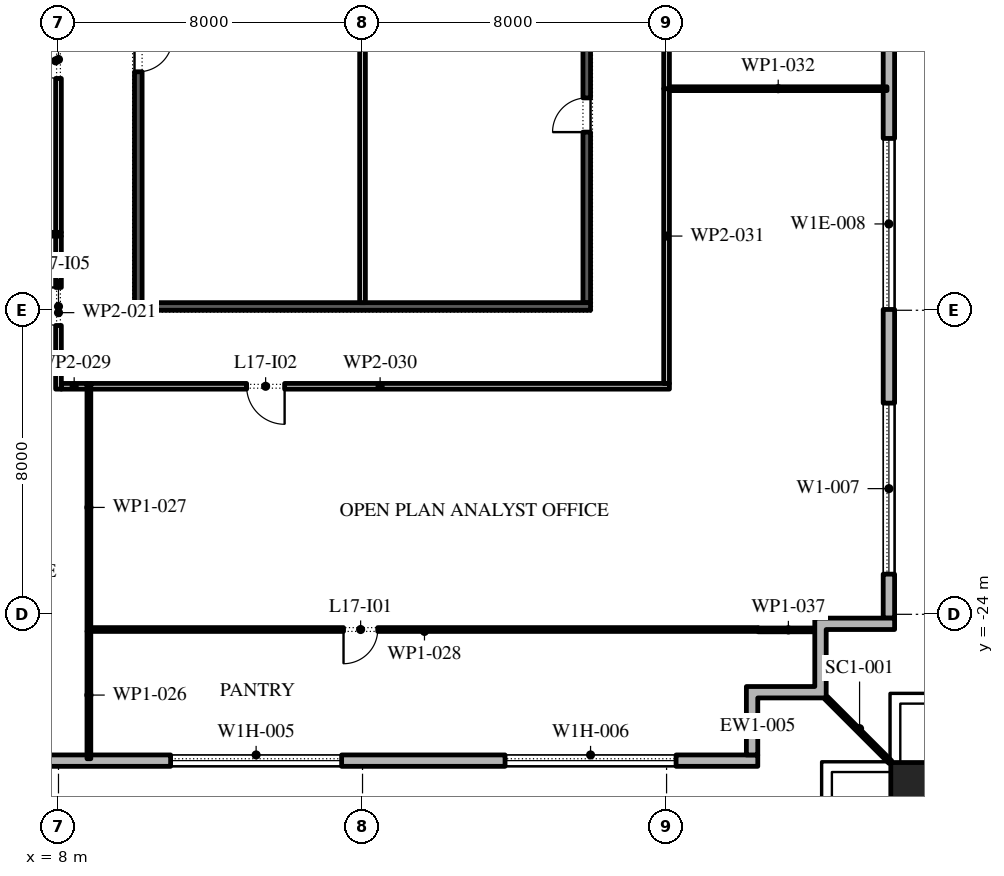
"""IFC4 building model, lengths in metres.
Left out: names, types, materials, properties, quantities, classifications, styles, units other than length and angle.
Written with IfcOpenShell. Run it as: python <this file> out.ifc"""

import sys

from ifc_helpers import new_model, si_unit, direction, frame, frame_2d, origin, origin_2d, place, context, subcontext, project, spatial, polyline, rectangle, outline, extrude, element, fill, save


model = new_model("IFC4")
c1 = context("Model", 3, precision=1e-05, world=origin(), true_north=direction((0.0, 1.0)))
c2 = subcontext(c1, "Body", "Model", "MODEL_VIEW")
j1 = project(units=[si_unit("LENGTHUNIT", "METRE"), si_unit("PLANEANGLEUNIT", "RADIAN")], contexts=[c1])
p1 = place(None, origin())
s1 = spatial("IfcSite", under=j1, at=p1, CompositionType="ELEMENT")
p2 = place(p1, origin())
s2 = spatial("IfcBuilding", under=s1, at=p2, CompositionType="ELEMENT")
p3 = place(p2, frame((0.0, 0.0, 81.6)))
s3 = spatial("IfcBuildingStorey", under=s2, at=p3, CompositionType="ELEMENT", Elevation=81.6)
p4 = place(p3, frame((30.6, -28.6, 0.0), z_axis=(0.0, 0.0, 1.0), x_axis=(1.0, 0.0, 0.0)))
e1 = element("IfcColumn", 1, at=p4, inside=s3, PredefinedType="COLUMN", context=c2, shape_type="SweptSolid", body=[
    extrude(rectangle(XDim=1.4, YDim=1.4, at=origin_2d()), origin(), (0.0, 0.0, 1.0), 4.2),
])
p5 = place(p3, frame((-26.1, -27.85, 0.0), z_axis=(0.0, 0.0, 1.0), x_axis=(1.0, 0.0, 0.0)))
e2 = element("IfcWall", 2, at=p5, inside=s3, PredefinedType="STANDARD", context=c2, shape_type="SweptSolid", body=[
    extrude(rectangle(XDim=52.5, YDim=0.3, at=frame_2d((26.25, 0.0))), origin(), (0.0, 0.0, 1.0), 4.0),
])
p6 = place(p5, frame((2.0, 0.0, 0.45)))
e3 = element("IfcOpeningElement", 3, at=p6, cuts=e2, PredefinedType="OPENING", context=c2, shape_type="SweptSolid", body=[
    extrude(rectangle(XDim=4.5, YDim=2.75, at=frame_2d((2.25, 1.375))), frame((0.0, 0.16, 0.0), z_axis=(0.0, -1.0, 0.0), x_axis=(1.0, 0.0, 0.0)), (0.0, 0.0, 1.0), 0.32),
])
p7 = place(p5, frame((10.65, 0.0, 0.45)))
e4 = element("IfcOpeningElement", 4, at=p7, cuts=e2, PredefinedType="OPENING", context=c2, shape_type="SweptSolid", body=[
    extrude(rectangle(XDim=4.5, YDim=2.75, at=frame_2d((2.25, 1.375))), frame((0.0, 0.16, 0.0), z_axis=(0.0, -1.0, 0.0), x_axis=(1.0, 0.0, 0.0)), (0.0, 0.0, 1.0), 0.32),
])
p8 = place(p5, frame((20.5, 0.0, 0.0)))
e5 = element("IfcOpeningElement", 5, at=p8, cuts=e2, PredefinedType="OPENING", context=c2, shape_type="SweptSolid", body=[
    extrude(rectangle(XDim=2.4, YDim=3.5, at=frame_2d((1.2, 1.75))), frame((0.0, 0.16, 0.0), z_axis=(0.0, -1.0, 0.0), x_axis=(1.0, 0.0, 0.0)), (0.0, 0.0, 1.0), 0.32),
])
p9 = place(p5, frame((28.25, 0.0, 0.45)))
e6 = element("IfcOpeningElement", 6, at=p9, cuts=e2, PredefinedType="OPENING", context=c2, shape_type="SweptSolid", body=[
    extrude(rectangle(XDim=4.5, YDim=2.75, at=frame_2d((2.25, 1.375))), frame((0.0, 0.16, 0.0), z_axis=(0.0, -1.0, 0.0), x_axis=(1.0, 0.0, 0.0)), (0.0, 0.0, 1.0), 0.32),
])
p10 = place(p5, frame((37.05, 0.0, 0.45)))
e7 = element("IfcOpeningElement", 7, at=p10, cuts=e2, PredefinedType="OPENING", context=c2, shape_type="SweptSolid", body=[
    extrude(rectangle(XDim=4.5, YDim=2.75, at=frame_2d((2.25, 1.375))), frame((0.0, 0.16, 0.0), z_axis=(0.0, -1.0, 0.0), x_axis=(1.0, 0.0, 0.0)), (0.0, 0.0, 1.0), 0.32),
])
p11 = place(p5, frame((45.85, 0.0, 0.45)))
e8 = element("IfcOpeningElement", 8, at=p11, cuts=e2, PredefinedType="OPENING", context=c2, shape_type="SweptSolid", body=[
    extrude(rectangle(XDim=4.5, YDim=2.75, at=frame_2d((2.25, 1.375))), frame((0.0, 0.16, 0.0), z_axis=(0.0, -1.0, 0.0), x_axis=(1.0, 0.0, 0.0)), (0.0, 0.0, 1.0), 0.32),
])
p12 = place(p3, frame((29.85, -24.1, 0.0), z_axis=(0.0, 0.0, 1.0), x_axis=(0.0, 1.0, 0.0)))
e9 = element("IfcWall", 9, at=p12, inside=s3, PredefinedType="STANDARD", context=c2, shape_type="SweptSolid", body=[
    extrude(rectangle(XDim=49.5, YDim=0.3, at=frame_2d((24.75, 0.0))), origin(), (0.0, 0.0, 1.0), 4.0),
])
p13 = place(p12, frame((1.157, 0.0, 0.45)))
e10 = element("IfcOpeningElement", 10, at=p13, cuts=e9, PredefinedType="OPENING", context=c2, shape_type="SweptSolid", body=[
    extrude(rectangle(XDim=4.5, YDim=3.05, at=frame_2d((2.25, 1.525))), frame((0.0, 0.16, 0.0), z_axis=(0.0, -1.0, 0.0), x_axis=(1.0, 0.0, 0.0)), (0.0, 0.0, 1.0), 0.32),
])
p14 = place(p12, frame((8.121, 0.0, 0.45)))
e11 = element("IfcOpeningElement", 11, at=p14, cuts=e9, PredefinedType="OPENING", context=c2, shape_type="SweptSolid", body=[
    extrude(rectangle(XDim=4.5, YDim=2.825, at=frame_2d((2.25, 1.413))), frame((0.0, 0.16, 0.0), z_axis=(0.0, -1.0, 0.0), x_axis=(1.0, 0.0, 0.0)), (0.0, 0.0, 1.0), 0.32),
])
p15 = place(p12, frame((16.286, 0.0, 0.0)))
e12 = element("IfcOpeningElement", 12, at=p15, cuts=e9, PredefinedType="OPENING", context=c2, shape_type="SweptSolid", body=[
    extrude(rectangle(XDim=2.4, YDim=3.325, at=frame_2d((1.2, 1.663))), frame((0.0, 0.16, 0.0), z_axis=(0.0, -1.0, 0.0), x_axis=(1.0, 0.0, 0.0)), (0.0, 0.0, 1.0), 0.32),
])
p16 = place(p12, frame((22.35, 0.0, 0.45)))
e13 = element("IfcOpeningElement", 13, at=p16, cuts=e9, PredefinedType="OPENING", context=c2, shape_type="SweptSolid", body=[
    extrude(rectangle(XDim=4.5, YDim=2.875, at=frame_2d((2.25, 1.438))), frame((0.0, 0.16, 0.0), z_axis=(0.0, -1.0, 0.0), x_axis=(1.0, 0.0, 0.0)), (0.0, 0.0, 1.0), 0.32),
])
p17 = place(p12, frame((29.464, 0.0, 0.45)))
e14 = element("IfcOpeningElement", 14, at=p17, cuts=e9, PredefinedType="OPENING", context=c2, shape_type="SweptSolid", body=[
    extrude(rectangle(XDim=4.5, YDim=2.875, at=frame_2d((2.25, 1.438))), frame((0.0, 0.16, 0.0), z_axis=(0.0, -1.0, 0.0), x_axis=(1.0, 0.0, 0.0)), (0.0, 0.0, 1.0), 0.32),
])
p18 = place(p12, frame((36.579, 0.0, 0.45)))
e15 = element("IfcOpeningElement", 15, at=p18, cuts=e9, PredefinedType="OPENING", context=c2, shape_type="SweptSolid", body=[
    extrude(rectangle(XDim=4.5, YDim=3.05, at=frame_2d((2.25, 1.525))), frame((0.0, 0.16, 0.0), z_axis=(0.0, -1.0, 0.0), x_axis=(1.0, 0.0, 0.0)), (0.0, 0.0, 1.0), 0.32),
])
p19 = place(p12, frame((44.743, 0.0, 0.0)))
e16 = element("IfcOpeningElement", 16, at=p19, cuts=e9, PredefinedType="OPENING", context=c2, shape_type="SweptSolid", body=[
    extrude(rectangle(XDim=2.4, YDim=3.325, at=frame_2d((1.2, 1.663))), frame((0.0, 0.16, 0.0), z_axis=(0.0, -1.0, 0.0), x_axis=(1.0, 0.0, 0.0)), (0.0, 0.0, 1.0), 0.32),
])
p20 = place(p3, origin())
e17 = element("IfcWall", 17, at=p20, inside=s3, PredefinedType="STANDARD", context=c2, shape_type="SweptSolid", body=[
    extrude(outline(polyline([(27.9, -25.9), (27.9, -24.1), (30.0, -24.1), (30.0, -24.4), (28.2, -24.4), (28.2, -26.2), (26.4, -26.2), (26.4, -27.7), (26.1, -27.7), (26.1, -25.9), (27.9, -25.9)])), origin(), (0.0, 0.0, 1.0), 4.0),
])
p21 = place(p3, frame((28.2, -26.2, -0.05), z_axis=(0.0, 0.0, 1.0), x_axis=(0.707106781187, -0.707106781187, 0.0)))
e18 = element("IfcWall", 18, at=p21, inside=s3, PredefinedType="STANDARD", context=c2, shape_type="SweptSolid", body=[
    extrude(rectangle(XDim=2.385, YDim=0.1, at=frame_2d((1.192, 0.0))), origin(), (0.0, 0.0, 1.0), 4.05),
])
p22 = place(p3, frame((21.9, -15.8, 0.0), z_axis=(0.0, 0.0, 1.0), x_axis=(0.0, 1.0, 0.0)))
e19 = element("IfcWall", 19, at=p22, inside=s3, PredefinedType="SHEAR", context=c2, shape_type="SweptSolid", body=[
    extrude(rectangle(XDim=13.05, YDim=0.2, at=frame_2d((6.525, 0.0))), origin(), (0.0, 0.0, 1.0), 4.0),
])
p23 = place(p22, frame((4.488, 0.0, 0.0)))
e20 = element("IfcOpeningElement", 20, at=p23, cuts=e19, PredefinedType="OPENING", context=c2, shape_type="SweptSolid", body=[
    extrude(rectangle(XDim=0.9, YDim=2.1, at=frame_2d((0.45, 1.05))), frame((0.0, 0.11, 0.0), z_axis=(0.0, -1.0, 0.0), x_axis=(1.0, 0.0, 0.0)), (0.0, 0.0, 1.0), 0.22),
])
p24 = place(p22, frame((11.038, 0.0, 0.0)))
e21 = element("IfcOpeningElement", 21, at=p24, cuts=e19, PredefinedType="OPENING", context=c2, shape_type="SweptSolid", body=[
    extrude(rectangle(XDim=1.0, YDim=2.1, at=frame_2d((0.5, 1.05))), frame((0.0, 0.11, 0.0), z_axis=(0.0, -1.0, 0.0), x_axis=(1.0, 0.0, 0.0)), (0.0, 0.0, 1.0), 0.22),
])
p25 = place(p3, frame((10.1, -15.8, 0.0), z_axis=(0.0, 0.0, 1.0), x_axis=(0.0, 1.0, 0.0)))
e22 = element("IfcWall", 22, at=p25, inside=s3, PredefinedType="SHEAR", context=c2, shape_type="SweptSolid", body=[
    extrude(rectangle(XDim=13.05, YDim=0.2, at=frame_2d((6.525, 0.0))), origin(), (0.0, 0.0, 1.0), 4.0),
])
p26 = place(p25, frame((6.075, 0.0, 0.0)))
e23 = element("IfcOpeningElement", 23, at=p26, cuts=e22, PredefinedType="OPENING", context=c2, shape_type="SweptSolid", body=[
    extrude(rectangle(XDim=0.9, YDim=2.1, at=frame_2d((0.45, 1.05))), frame((0.0, 0.11, 0.0), z_axis=(0.0, -1.0, 0.0), x_axis=(1.0, 0.0, 0.0)), (0.0, 0.0, 1.0), 0.22),
])
p27 = place(p3, frame((10.0, -15.9, 0.0), z_axis=(0.0, 0.0, 1.0), x_axis=(1.0, 0.0, 0.0)))
e24 = element("IfcWall", 24, at=p27, inside=s3, PredefinedType="SHEAR", context=c2, shape_type="SweptSolid", body=[
    extrude(rectangle(XDim=12.0, YDim=0.2, at=frame_2d((6.0, 0.0))), origin(), (0.0, 0.0, 1.0), 4.0),
])
p28 = place(p3, frame((16.0, -15.8, 0.0), z_axis=(0.0, 0.0, 1.0), x_axis=(0.0, 1.0, 0.0)))
e25 = element("IfcWall", 25, at=p28, inside=s3, PredefinedType="PARTITIONING", context=c2, shape_type="SweptSolid", body=[
    extrude(rectangle(XDim=13.05, YDim=0.15, at=frame_2d((6.525, 0.0))), origin(), (0.0, 0.0, 1.0), 4.0),
])
p29 = place(p28, frame((11.087, 0.0, 0.0)))
e26 = element("IfcOpeningElement", 26, at=p29, cuts=e25, PredefinedType="OPENING", context=c2, shape_type="SweptSolid", body=[
    extrude(rectangle(XDim=0.9, YDim=2.1, at=frame_2d((0.45, 1.05))), frame((0.0, 0.085, 0.0), z_axis=(0.0, -1.0, 0.0), x_axis=(1.0, 0.0, 0.0)), (0.0, 0.0, 1.0), 0.17),
])
p30 = place(p3, frame((0.05, -14.0, 0.0), z_axis=(0.0, 0.0, 1.0), x_axis=(1.0, 0.0, 0.0)))
e27 = element("IfcWall", 27, at=p30, inside=s3, PredefinedType="PARTITIONING", context=c2, shape_type="SweptSolid", body=[
    extrude(rectangle(XDim=8.025, YDim=0.1, at=frame_2d((4.012, 0.0))), origin(), (0.0, 0.0, 1.0), 4.0),
])
p31 = place(p3, frame((8.0, -18.075, 0.0), z_axis=(0.0, 0.0, 1.0), x_axis=(0.0, 1.0, 0.0)))
e28 = element("IfcWall", 28, at=p31, inside=s3, PredefinedType="PARTITIONING", context=c2, shape_type="SweptSolid", body=[
    extrude(rectangle(XDim=4.025, YDim=0.15, at=frame_2d((2.012, 0.0))), origin(), (0.0, 0.0, 1.0), 4.0),
])
p32 = place(p31, frame((1.675, 0.0, 0.0)))
e29 = element("IfcOpeningElement", 29, at=p32, cuts=e28, PredefinedType="OPENING", context=c2, shape_type="SweptSolid", body=[
    extrude(rectangle(XDim=1.0, YDim=2.1, at=frame_2d((0.5, 1.05))), frame((0.0, 0.085, 0.0), z_axis=(0.0, -1.0, 0.0), x_axis=(1.0, 0.0, 0.0)), (0.0, 0.0, 1.0), 0.17),
])
p33 = place(p3, frame((8.0, -13.95, 0.0), z_axis=(0.0, 0.0, 1.0), x_axis=(0.0, 1.0, 0.0)))
e30 = element("IfcWall", 30, at=p33, inside=s3, PredefinedType="PARTITIONING", context=c2, shape_type="SweptSolid", body=[
    extrude(rectangle(XDim=9.025, YDim=0.15, at=frame_2d((4.512, 0.0))), origin(), (0.0, 0.0, 1.0), 4.0),
])
p34 = place(p33, frame((4.05, 0.0, 0.0)))
e31 = element("IfcOpeningElement", 31, at=p34, cuts=e30, PredefinedType="OPENING", context=c2, shape_type="SweptSolid", body=[
    extrude(rectangle(XDim=1.0, YDim=2.1, at=frame_2d((0.5, 1.05))), frame((0.0, 0.085, 0.0), z_axis=(0.0, -1.0, 0.0), x_axis=(1.0, 0.0, 0.0)), (0.0, 0.0, 1.0), 0.17),
])
p35 = place(p3, frame((8.8, -27.8, 0.0), z_axis=(0.0, 0.0, 1.0), x_axis=(0.0, 1.0, 0.0)))
e32 = element("IfcWall", 32, at=p35, inside=s3, PredefinedType="PARTITIONING", context=c2, shape_type="SweptSolid", body=[
    extrude(rectangle(XDim=3.35, YDim=0.1, at=frame_2d((1.675, 0.0))), origin(), (0.0, 0.0, 1.0), 4.0),
])
p36 = place(p3, frame((8.8, -24.45, 0.0), z_axis=(0.0, 0.0, 1.0), x_axis=(0.0, 1.0, 0.0)))
e33 = element("IfcWall", 33, at=p36, inside=s3, PredefinedType="PARTITIONING", context=c2, shape_type="SweptSolid", body=[
    extrude(rectangle(XDim=6.525, YDim=0.1, at=frame_2d((3.262, 0.0))), origin(), (0.0, 0.0, 1.0), 4.0),
])
p37 = place(p3, frame((8.85, -24.4, 0.0), z_axis=(0.0, 0.0, 1.0), x_axis=(1.0, 0.0, 0.0)))
e34 = element("IfcWall", 34, at=p37, inside=s3, PredefinedType="PARTITIONING", context=c2, shape_type="SweptSolid", body=[
    extrude(rectangle(XDim=17.56, YDim=0.1, at=frame_2d((8.78, 0.0))), origin(), (0.0, 0.0, 1.0), 4.0),
])
p38 = place(p37, frame((6.65, 0.0, 0.0)))
e35 = element("IfcOpeningElement", 35, at=p38, cuts=e34, PredefinedType="OPENING", context=c2, shape_type="SweptSolid", body=[
    extrude(rectangle(XDim=0.9, YDim=2.1, at=frame_2d((0.45, 1.05))), frame((0.0, 0.06, 0.0), z_axis=(0.0, -1.0, 0.0), x_axis=(1.0, 0.0, 0.0)), (0.0, 0.0, 1.0), 0.12),
])
p39 = place(p3, frame((8.75, -18.0, 0.0), z_axis=(0.0, 0.0, 1.0), x_axis=(-1.0, 0.0, 0.0)))
e36 = element("IfcWall", 36, at=p39, inside=s3, PredefinedType="PARTITIONING", context=c2, shape_type="SweptSolid", body=[
    extrude(rectangle(XDim=0.675, YDim=0.15, at=frame_2d((0.337, 0.0))), origin(), (0.0, 0.0, 1.0), 4.0),
])
p40 = place(p3, frame((24.075, -18.0, 0.0), z_axis=(0.0, 0.0, 1.0), x_axis=(-1.0, 0.0, 0.0)))
e37 = element("IfcWall", 37, at=p40, inside=s3, PredefinedType="PARTITIONING", context=c2, shape_type="SweptSolid", body=[
    extrude(rectangle(XDim=15.225, YDim=0.15, at=frame_2d((7.612, 0.0))), origin(), (0.0, 0.0, 1.0), 4.0),
])
p41 = place(p40, frame((10.125, 0.0, 0.0)))
e38 = element("IfcOpeningElement", 38, at=p41, cuts=e37, PredefinedType="OPENING", context=c2, shape_type="SweptSolid", body=[
    extrude(rectangle(XDim=1.0, YDim=2.1, at=frame_2d((0.5, 1.05))), frame((0.0, 0.085, 0.0), z_axis=(0.0, -1.0, 0.0), x_axis=(1.0, 0.0, 0.0)), (0.0, 0.0, 1.0), 0.17),
])
p42 = place(p3, frame((24.0, -10.17, 0.0), z_axis=(0.0, 0.0, 1.0), x_axis=(0.0, -1.0, 0.0)))
e39 = element("IfcWall", 39, at=p42, inside=s3, PredefinedType="PARTITIONING", context=c2, shape_type="SweptSolid", body=[
    extrude(rectangle(XDim=7.755, YDim=0.15, at=frame_2d((3.877, 0.0))), origin(), (0.0, 0.0, 1.0), 4.0),
])
p43 = place(p3, frame((24.075, -10.17, 0.0), z_axis=(0.0, 0.0, 1.0), x_axis=(1.0, 0.0, 0.0)))
e40 = element("IfcWall", 40, at=p43, inside=s3, PredefinedType="PARTITIONING", context=c2, shape_type="SweptSolid", body=[
    extrude(rectangle(XDim=5.725, YDim=0.1, at=frame_2d((2.863, 0.0))), origin(), (0.0, 0.0, 1.0), 4.0),
])
p44 = place(p3, frame((24.0, 11.22, 0.0), z_axis=(0.0, 0.0, 1.0), x_axis=(0.0, -1.0, 0.0)))
e41 = element("IfcWall", 41, at=p44, inside=s3, PredefinedType="PARTITIONING", context=c2, shape_type="SweptSolid", body=[
    extrude(rectangle(XDim=21.39, YDim=0.15, at=frame_2d((10.695, 0.0))), origin(), (0.0, 0.0, 1.0), 4.0),
])
p45 = place(p44, frame((14.49, 0.0, 0.0)))
e42 = element("IfcOpeningElement", 42, at=p45, cuts=e41, PredefinedType="OPENING", context=c2, shape_type="SweptSolid", body=[
    extrude(rectangle(XDim=1.0, YDim=2.1, at=frame_2d((0.5, 1.05))), frame((0.0, 0.085, 0.0), z_axis=(0.0, -1.0, 0.0), x_axis=(1.0, 0.0, 0.0)), (0.0, 0.0, 1.0), 0.17),
])
p46 = place(p3, frame((26.41, -24.41, 0.0), z_axis=(0.0, 0.0, 1.0), x_axis=(1.0, 0.0, 0.0)))
e43 = element("IfcWall", 43, at=p46, inside=s3, PredefinedType="PARTITIONING", context=c2, shape_type="SweptSolid", body=[
    extrude(rectangle(XDim=1.59, YDim=0.1, at=frame_2d((0.795, 0.0))), origin(), (0.0, 0.0, 1.0), 4.0),
])
p47 = place(p10, origin())
e44 = element("IfcWindow", 44, at=p47, inside=s3, PartitioningType="DOUBLE_PANEL_VERTICAL", PredefinedType="WINDOW", context=c2, shape_type="SweptSolid", body=[
    extrude(rectangle(XDim=4.5, YDim=2.75, at=frame_2d((2.25, 1.375))), frame((0.0, 0.03, 0.0), z_axis=(0.0, -1.0, 0.0), x_axis=(1.0, 0.0, 0.0)), (0.0, 0.0, 1.0), 0.06),
])
fill(e7, e44)
p48 = place(p11, origin())
e45 = element("IfcWindow", 45, at=p48, inside=s3, PartitioningType="DOUBLE_PANEL_VERTICAL", PredefinedType="WINDOW", context=c2, shape_type="SweptSolid", body=[
    extrude(rectangle(XDim=4.5, YDim=2.75, at=frame_2d((2.25, 1.375))), frame((0.0, 0.03, 0.0), z_axis=(0.0, -1.0, 0.0), x_axis=(1.0, 0.0, 0.0)), (0.0, 0.0, 1.0), 0.06),
])
fill(e8, e45)
p49 = place(p13, origin())
e46 = element("IfcWindow", 46, at=p49, inside=s3, PartitioningType="DOUBLE_PANEL_VERTICAL", PredefinedType="WINDOW", context=c2, shape_type="SweptSolid", body=[
    extrude(rectangle(XDim=4.5, YDim=3.05, at=frame_2d((2.25, 1.525))), frame((0.0, 0.03, 0.0), z_axis=(0.0, -1.0, 0.0), x_axis=(1.0, 0.0, 0.0)), (0.0, 0.0, 1.0), 0.06),
])
fill(e10, e46)
p50 = place(p14, origin())
e47 = element("IfcWindow", 47, at=p50, inside=s3, PartitioningType="DOUBLE_PANEL_VERTICAL", PredefinedType="WINDOW", context=c2, shape_type="SweptSolid", body=[
    extrude(rectangle(XDim=4.5, YDim=2.825, at=frame_2d((2.25, 1.413))), frame((0.0, 0.03, 0.0), z_axis=(0.0, -1.0, 0.0), x_axis=(1.0, 0.0, 0.0)), (0.0, 0.0, 1.0), 0.06),
])
fill(e11, e47)
p51 = place(p23, origin())
e48 = element("IfcDoor", 48, at=p51, inside=s3, OperationType="SINGLE_SWING_RIGHT", PredefinedType="DOOR", context=c2, shape_type="SweptSolid", body=[
    extrude(rectangle(XDim=0.9, YDim=2.1, at=frame_2d((0.45, 1.05))), frame((0.0, 0.1, 0.0), z_axis=(0.0, -1.0, 0.0), x_axis=(1.0, 0.0, 0.0)), (0.0, 0.0, 1.0), 0.05),
])
fill(e20, e48)
p52 = place(p26, frame((0.9, -0.15, 0.0), z_axis=(0.0, 0.0, 1.0), x_axis=(-1.0, 0.0, 0.0)))
e49 = element("IfcDoor", 49, at=p52, inside=s3, OperationType="SINGLE_SWING_RIGHT", PredefinedType="DOOR", context=c2, shape_type="SweptSolid", body=[
    extrude(rectangle(XDim=0.9, YDim=2.1, at=frame_2d((0.45, 1.05))), frame((0.0, -0.05, 0.0), z_axis=(0.0, -1.0, 0.0), x_axis=(1.0, 0.0, 0.0)), (0.0, 0.0, 1.0), 0.05),
])
fill(e23, e49)
p53 = place(p38, frame((0.9, 0.0, 0.0), z_axis=(0.0, 0.0, 1.0), x_axis=(-1.0, 0.0, 0.0)))
e50 = element("IfcDoor", 50, at=p53, inside=s3, OperationType="SINGLE_SWING_LEFT", PredefinedType="DOOR", context=c2, shape_type="SweptSolid", body=[
    extrude(rectangle(XDim=0.9, YDim=2.1, at=frame_2d((0.45, 1.05))), frame((0.0, 0.025, 0.0), z_axis=(0.0, -1.0, 0.0), x_axis=(1.0, 0.0, 0.0)), (0.0, 0.0, 1.0), 0.05),
])
fill(e35, e50)
p54 = place(p41, origin())
e51 = element("IfcDoor", 51, at=p54, inside=s3, OperationType="SINGLE_SWING_RIGHT", PredefinedType="DOOR", context=c2, shape_type="SweptSolid", body=[
    extrude(rectangle(XDim=1.0, YDim=2.1, at=frame_2d((0.5, 1.05))), frame((0.0, 0.025, 0.0), z_axis=(0.0, -1.0, 0.0), x_axis=(1.0, 0.0, 0.0)), (0.0, 0.0, 1.0), 0.05),
])
fill(e38, e51)
p55 = place(p32, origin())
e52 = element("IfcDoor", 52, at=p55, inside=s3, OperationType="SINGLE_SWING_LEFT", PredefinedType="DOOR", context=c2, shape_type="SweptSolid", body=[
    extrude(rectangle(XDim=1.0, YDim=2.1, at=frame_2d((0.5, 1.05))), frame((0.0, 0.025, 0.0), z_axis=(0.0, -1.0, 0.0), x_axis=(1.0, 0.0, 0.0)), (0.0, 0.0, 1.0), 0.05),
])
fill(e29, e52)
p56 = place(p34, origin())
e53 = element("IfcDoor", 53, at=p56, inside=s3, OperationType="SINGLE_SWING_LEFT", PredefinedType="DOOR", context=c2, shape_type="SweptSolid", body=[
    extrude(rectangle(XDim=1.0, YDim=2.1, at=frame_2d((0.5, 1.05))), frame((0.0, 0.025, 0.0), z_axis=(0.0, -1.0, 0.0), x_axis=(1.0, 0.0, 0.0)), (0.0, 0.0, 1.0), 0.05),
])
fill(e31, e53)
save(model, sys.argv[1])
